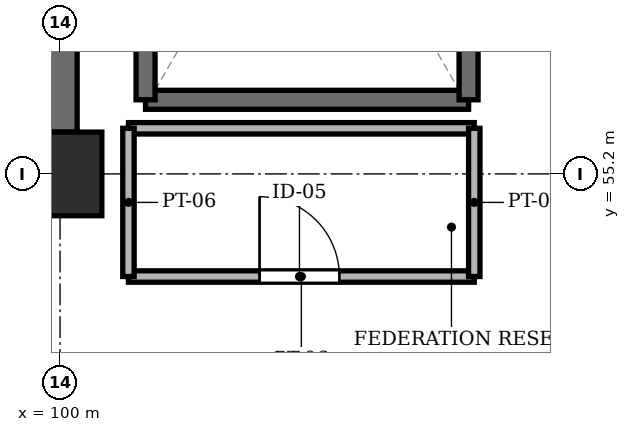
"""IFC4 building model, lengths in metres.
Left out: names, types, materials, properties, quantities, classifications, styles, units other than length and angle.
Written with IfcOpenShell. Run it as: python <this file> out.ifc"""

import sys

from ifc_helpers import new_model, si_unit, direction, frame, frame_2d, origin, origin_2d, place, context, subcontext, project, spatial, rectangle, extrude, element, fill, save


model = new_model("IFC4")
c1 = context("Model", 3, precision=1e-05, world=origin(), true_north=direction((0.0, 1.0)))
c2 = subcontext(c1, "Body", "Model", "MODEL_VIEW")
j1 = project(units=[si_unit("LENGTHUNIT", "METRE"), si_unit("PLANEANGLEUNIT", "RADIAN")], contexts=[c1])
p1 = place(None, origin())
s1 = spatial("IfcSite", under=j1, at=p1, CompositionType="ELEMENT")
p2 = place(p1, origin())
s2 = spatial("IfcBuilding", under=s1, at=p2, CompositionType="ELEMENT")
p3 = place(p2, frame((0.0, 0.0, 30.8)))
s3 = spatial("IfcBuildingStorey", under=s2, at=p3, CompositionType="ELEMENT", Elevation=30.8)
p4 = place(p3, frame((100.0, 55.2, -0.26), z_axis=(0.0, 0.0, 1.0), x_axis=(1.0, 0.0, 0.0)))
e1 = element("IfcColumn", 1, at=p4, inside=s3, PredefinedType="COLUMN", context=c2, shape_type="SweptSolid", body=[
    extrude(rectangle(XDim=1.1, YDim=1.1, at=origin_2d()), origin(), (0.0, 0.0, 1.0), 3.26),
])
p5 = place(p3, frame((100.0, 55.75, 0.0), z_axis=(0.0, 0.0, 1.0), x_axis=(0.0, 1.0, 0.0)))
e2 = element("IfcWall", 2, at=p5, inside=s3, PredefinedType="SHEAR", context=c2, shape_type="SweptSolid", body=[
    extrude(rectangle(XDim=6.2, YDim=0.45, at=frame_2d((3.1, 0.0))), origin(), (0.0, 0.0, 1.0), 3.0),
])
p6 = place(p3, frame((101.125, 56.175, 0.0), z_axis=(0.0, 0.0, 1.0), x_axis=(1.0, 0.0, 0.0)))
e3 = element("IfcWall", 3, at=p6, inside=s3, PredefinedType="SHEAR", context=c2, shape_type="SweptSolid", body=[
    extrude(rectangle(XDim=4.25, YDim=0.25, at=frame_2d((2.125, 0.0))), origin(), (0.0, 0.0, 1.0), 3.0),
])
for number, where, z_axis, x_axis in (
    (4, (101.125, 63.375, 0.0), (0.0, 0.0, 1.0), (0.0, -1.0, 0.0)),
    (5, (105.375, 56.175, 0.0), (0.0, 0.0, 1.0), (0.0, 1.0, 0.0)),
):
    element("IfcWall", number, at=place(p3, frame(where, z_axis=z_axis, x_axis=x_axis)), inside=s3, PredefinedType="SHEAR", context=c2, shape_type="SweptSolid", body=[
        extrude(rectangle(XDim=7.2, YDim=0.25, at=frame_2d((3.6, 0.0))), origin(), (0.0, 0.0, 1.0), 3.0),
    ])
p7 = place(p3, frame((100.9, 53.85, 0.0), z_axis=(0.0, 0.0, 1.0), x_axis=(1.0, 0.0, 0.0)))
e6 = element("IfcWall", 6, at=p7, inside=s3, PredefinedType="PARTITIONING", context=c2, shape_type="SweptSolid", body=[
    extrude(rectangle(XDim=4.55, YDim=0.15, at=frame_2d((2.275, 0.0))), origin(), (0.0, 0.0, 1.0), 2.53),
])
p8 = place(p7, frame((1.725, 0.0, 0.0)))
e7 = element("IfcOpeningElement", 7, at=p8, cuts=e6, PredefinedType="OPENING", context=c2, shape_type="SweptSolid", body=[
    extrude(rectangle(XDim=1.05, YDim=2.15, at=frame_2d((0.525, 1.075))), frame((0.0, 0.087, 0.0), z_axis=(0.0, -1.0, 0.0), x_axis=(1.0, 0.0, 0.0)), (0.0, 0.0, 1.0), 0.174),
])
p9 = place(p3, frame((100.9, 55.8, 0.0), z_axis=(0.0, 0.0, 1.0), x_axis=(1.0, 0.0, 0.0)))
e8 = element("IfcWall", 8, at=p9, inside=s3, PredefinedType="PARTITIONING", context=c2, shape_type="SweptSolid", body=[
    extrude(rectangle(XDim=4.55, YDim=0.15, at=frame_2d((2.275, 0.0))), origin(), (0.0, 0.0, 1.0), 2.53),
])
for number, where, z_axis, x_axis in (
    (9, (100.9, 53.85, 0.0), (0.0, 0.0, 1.0), (0.0, 1.0, 0.0)),
    (10, (105.45, 53.85, 0.0), (0.0, 0.0, 1.0), (0.0, 1.0, 0.0)),
):
    element("IfcWall", number, at=place(p3, frame(where, z_axis=z_axis, x_axis=x_axis)), inside=s3, PredefinedType="PARTITIONING", context=c2, shape_type="SweptSolid", body=[
        extrude(rectangle(XDim=1.95, YDim=0.15, at=frame_2d((0.975, 0.0))), origin(), (0.0, 0.0, 1.0), 2.53),
    ])
p10 = place(p8, origin())
e11 = element("IfcDoor", 11, at=p10, inside=s3, OperationType="SINGLE_SWING_LEFT", PredefinedType="DOOR", context=c2, shape_type="SweptSolid", body=[
    extrude(rectangle(XDim=1.05, YDim=2.15, at=frame_2d((0.525, 1.075))), frame((0.0, 0.025, 0.0), z_axis=(0.0, -1.0, 0.0), x_axis=(1.0, 0.0, 0.0)), (0.0, 0.0, 1.0), 0.05),
])
fill(e7, e11)
save(model, sys.argv[1])
